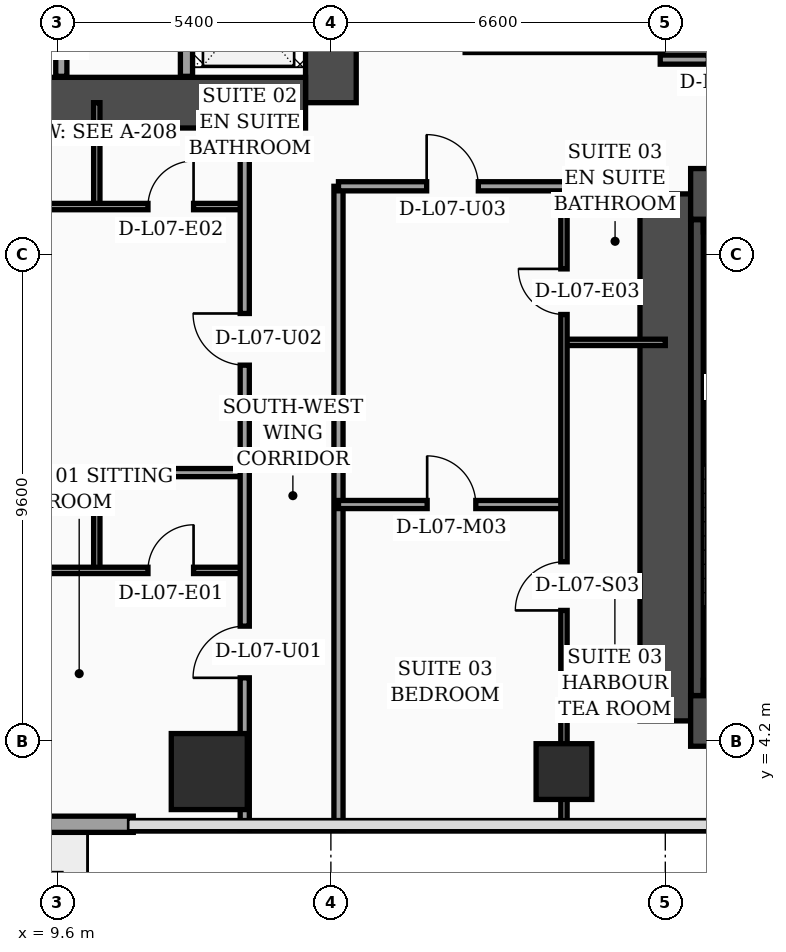
"""IFC4 building model, lengths in metres.
Left out: names, types, materials, properties, quantities, classifications, styles, units other than length and angle.
Written with IfcOpenShell. Run it as: python <this file> out.ifc"""

import sys

from ifc_helpers import new_model, si_unit, direction, frame, frame_2d, origin, origin_2d, place, context, subcontext, project, spatial, rectangle, hollow_rectangle, extrude, element, fill, save


model = new_model("IFC4")
c1 = context("Model", 3, precision=1e-05, world=origin(), true_north=direction((0.0, 1.0)))
c2 = subcontext(c1, "Body", "Model", "MODEL_VIEW")
j1 = project(units=[si_unit("LENGTHUNIT", "METRE"), si_unit("PLANEANGLEUNIT", "RADIAN")], contexts=[c1])
p1 = place(None, origin())
s1 = spatial("IfcSite", under=j1, at=p1, CompositionType="ELEMENT")
p2 = place(p1, origin())
s2 = spatial("IfcBuilding", under=s1, at=p2, CompositionType="ELEMENT")
p3 = place(p2, frame((0.0, 0.0, 34.6)))
s3 = spatial("IfcBuildingStorey", under=s2, at=p3, CompositionType="ELEMENT", Elevation=34.6)
p4 = place(p3, frame((15.0, 16.8, 0.0), z_axis=(0.0, 0.0, 1.0), x_axis=(0.0, 1.0, 0.0)))
e1 = element("IfcWall", 1, at=p4, inside=s3, PredefinedType="SHEAR", context=c2, shape_type="SweptSolid", body=[
    extrude(rectangle(XDim=21.6, YDim=1.0, at=frame_2d((10.8, 0.0))), origin(), (0.0, 0.0, 1.0), 3.56),
])
p5 = place(p4, frame((8.65, 0.0, 0.0)))
e2 = element("IfcOpeningElement", 2, at=p5, cuts=e1, PredefinedType="OPENING", context=c2, shape_type="SweptSolid", body=[
    extrude(rectangle(XDim=1.1, YDim=2.2, at=frame_2d((0.55, 1.1))), frame((0.0, 0.51, 0.0), z_axis=(0.0, -1.0, 0.0), x_axis=(1.0, 0.0, 0.0)), (0.0, 0.0, 1.0), 1.02),
])
p6 = place(p4, frame((1.25, 0.0, 0.0)))
e3 = element("IfcOpeningElement", 3, at=p6, cuts=e1, PredefinedType="OPENING", context=c2, shape_type="SweptSolid", body=[
    extrude(rectangle(XDim=1.1, YDim=2.2, at=frame_2d((0.55, 1.1))), frame((0.0, 0.51, 0.0), z_axis=(0.0, -1.0, 0.0), x_axis=(1.0, 0.0, 0.0)), (0.0, 0.0, 1.0), 1.02),
])
p7 = place(p4, frame((3.8, 0.0, 0.0)))
e4 = element("IfcOpeningElement", 4, at=p7, cuts=e1, PredefinedType="OPENING", context=c2, shape_type="SweptSolid", body=[
    extrude(rectangle(XDim=1.1, YDim=2.2, at=frame_2d((0.55, 1.1))), frame((0.0, 0.51, 0.0), z_axis=(0.0, -1.0, 0.0), x_axis=(1.0, 0.0, 0.0)), (0.0, 0.0, 1.0), 1.02),
])
p8 = place(p4, frame((6.35, 0.0, 0.0)))
e5 = element("IfcOpeningElement", 5, at=p8, cuts=e1, PredefinedType="OPENING", context=c2, shape_type="SweptSolid", body=[
    extrude(rectangle(XDim=1.1, YDim=2.2, at=frame_2d((0.55, 1.1))), frame((0.0, 0.51, 0.0), z_axis=(0.0, -1.0, 0.0), x_axis=(1.0, 0.0, 0.0)), (0.0, 0.0, 1.0), 1.02),
])
p9 = place(p3, frame((4.7, 16.8, 0.0), z_axis=(0.0, 0.0, 1.0), x_axis=(1.0, 0.0, 0.0)))
e6 = element("IfcWall", 6, at=p9, inside=s3, PredefinedType="SHEAR", context=c2, shape_type="SweptSolid", body=[
    extrude(rectangle(XDim=9.8, YDim=1.0, at=frame_2d((4.9, 0.0))), origin(), (0.0, 0.0, 1.0), 3.56),
])
p10 = place(p3, frame((21.6, 4.6, 0.0), z_axis=(0.0, 0.0, 1.0), x_axis=(0.0, 1.0, 0.0)))
e7 = element("IfcWall", 7, at=p10, inside=s3, PredefinedType="SHEAR", context=c2, shape_type="SweptSolid", body=[
    extrude(rectangle(XDim=10.4, YDim=1.0, at=frame_2d((5.2, 0.0))), origin(), (0.0, 0.0, 1.0), 3.56),
])
p11 = place(p3, frame((22.1, 15.0, 0.0), z_axis=(0.0, 0.0, 1.0), x_axis=(1.0, 0.0, 0.0)))
e8 = element("IfcWall", 8, at=p11, inside=s3, PredefinedType="SHEAR", context=c2, shape_type="SweptSolid", body=[
    extrude(rectangle(XDim=9.8, YDim=1.0, at=frame_2d((4.9, 0.0))), origin(), (0.0, 0.0, 1.0), 3.56),
])
p12 = place(p11, frame((4.8, 0.0, 0.0)))
e9 = element("IfcOpeningElement", 9, at=p12, cuts=e8, PredefinedType="OPENING", context=c2, shape_type="SweptSolid", body=[
    extrude(rectangle(XDim=1.1, YDim=2.2, at=frame_2d((0.55, 1.1))), frame((0.0, 0.51, 0.0), z_axis=(0.0, -1.0, 0.0), x_axis=(1.0, 0.0, 0.0)), (0.0, 0.0, 1.0), 1.02),
])
p13 = place(p3, frame((22.1, 4.6, 0.0), z_axis=(0.0, 0.0, 1.0), x_axis=(1.0, 0.0, 0.0)))
e10 = element("IfcWall", 10, at=p13, inside=s3, PredefinedType="SHEAR", context=c2, shape_type="SweptSolid", body=[
    extrude(rectangle(XDim=9.8, YDim=1.0, at=frame_2d((4.9, 0.0))), origin(), (0.0, 0.0, 1.0), 3.56),
])
p14 = place(p3, frame((22.23, 5.1, 0.0), z_axis=(0.0, 0.0, 1.0), x_axis=(0.0, 1.0, 0.0)))
e11 = element("IfcWall", 11, at=p14, inside=s3, PredefinedType="SOLIDWALL", context=c2, shape_type="SweptSolid", body=[
    extrude(rectangle(XDim=9.39, YDim=0.24, at=frame_2d((4.695, 0.0))), origin(), (0.0, 0.0, 1.0), 3.56),
])
for number, where, z_axis, x_axis in (
    (12, (22.35, 5.28, 0.0), (0.0, 0.0, 1.0), (1.0, 0.0, 0.0)),
    (13, (22.35, 14.37, 0.0), (0.0, 0.0, 1.0), (1.0, 0.0, 0.0)),
):
    element("IfcWall", number, at=place(p3, frame(where, z_axis=z_axis, x_axis=x_axis)), inside=s3, PredefinedType="SOLIDWALL", context=c2, shape_type="SweptSolid", body=[
        extrude(rectangle(XDim=3.1, YDim=0.24, at=frame_2d((1.55, 0.0))), origin(), (0.0, 0.0, 1.0), 3.56),
    ])
p15 = place(p3, frame((12.6, 3.6, 0.0), z_axis=(0.0, 0.0, 1.0), x_axis=(1.0, 0.0, 0.0)))
e14 = element("IfcColumn", 14, at=p15, inside=s3, PredefinedType="COLUMN", context=c2, shape_type="SweptSolid", body=[
    extrude(rectangle(XDim=1.5, YDim=1.5, at=origin_2d()), origin(), (0.0, 0.0, 1.0), 3.56),
])
p16 = place(p3, frame((19.6, 3.6, 0.0), z_axis=(0.0, 0.0, 1.0), x_axis=(1.0, 0.0, 0.0)))
e15 = element("IfcColumn", 15, at=p16, inside=s3, PredefinedType="COLUMN", context=c2, shape_type="SweptSolid", body=[
    extrude(hollow_rectangle(XDim=1.1, YDim=1.1, WallThickness=0.045, at=origin_2d()), origin(), (0.0, 0.0, 1.0), 3.56),
])
p17 = place(p3, frame((3.1, 2.56, 0.0), z_axis=(0.0, 0.0, 1.0), x_axis=(1.0, 0.0, 0.0)))
e16 = element("IfcWall", 16, at=p17, inside=s3, PredefinedType="SOLIDWALL", context=c2, shape_type="SweptSolid", body=[
    extrude(rectangle(XDim=8.0, YDim=0.32, at=frame_2d((4.0, 0.0))), origin(), (0.0, 0.0, 1.0), 3.56),
])
p18 = place(p17, frame((0.45, 0.0, 0.75)))
e17 = element("IfcOpeningElement", 17, at=p18, cuts=e16, PredefinedType="OPENING", context=c2, shape_type="SweptSolid", body=[
    extrude(rectangle(XDim=1.0, YDim=1.6, at=frame_2d((0.5, 0.8))), frame((0.0, 0.17, 0.0), z_axis=(0.0, -1.0, 0.0), x_axis=(1.0, 0.0, 0.0)), (0.0, 0.0, 1.0), 0.34),
])
p19 = place(p17, frame((4.2, 0.0, 0.0)))
e18 = element("IfcOpeningElement", 18, at=p19, cuts=e16, PredefinedType="OPENING", context=c2, shape_type="SweptSolid", body=[
    extrude(rectangle(XDim=1.4, YDim=2.25, at=frame_2d((0.7, 1.125))), frame((0.0, 0.17, 0.0), z_axis=(0.0, -1.0, 0.0), x_axis=(1.0, 0.0, 0.0)), (0.0, 0.0, 1.0), 0.34),
])
p20 = place(p3, frame((9.68, 17.32, 0.0), z_axis=(0.0, 0.0, 1.0), x_axis=(0.0, 1.0, 0.0)))
e19 = element("IfcWall", 19, at=p20, inside=s3, PredefinedType="SOLIDWALL", context=c2, shape_type="SweptSolid", body=[
    extrude(rectangle(XDim=7.68, YDim=0.22, at=frame_2d((3.84, 0.0))), origin(), (0.0, 0.0, 1.0), 3.56),
])
p21 = place(p3, frame((12.15, 17.32, 0.0), z_axis=(0.0, 0.0, 1.0), x_axis=(0.0, 1.0, 0.0)))
e20 = element("IfcWall", 20, at=p21, inside=s3, PredefinedType="SOLIDWALL", context=c2, shape_type="SweptSolid", body=[
    extrude(rectangle(XDim=7.65, YDim=0.24, at=frame_2d((3.825, 0.0))), origin(), (0.0, 0.0, 1.0), 3.56),
])
p22 = place(p3, frame((10.38, 7.57, 0.0), z_axis=(0.0, 0.0, 1.0), x_axis=(0.0, 1.0, 0.0)))
e21 = element("IfcWall", 21, at=p22, inside=s3, PredefinedType="PARTITIONING", context=c2, shape_type="SweptSolid", body=[
    extrude(rectangle(XDim=1.93, YDim=0.125, at=frame_2d((0.965, 0.0))), origin(), (0.0, 0.0, 1.0), 3.09),
])
p23 = place(p3, frame((3.2, 7.57, 0.0), z_axis=(0.0, 0.0, 1.0), x_axis=(1.0, 0.0, 0.0)))
e22 = element("IfcWall", 22, at=p23, inside=s3, PredefinedType="PARTITIONING", context=c2, shape_type="SweptSolid", body=[
    extrude(rectangle(XDim=10.1, YDim=0.125, at=frame_2d((5.05, 0.0))), origin(), (0.0, 0.0, 1.0), 2.84),
])
p24 = place(p23, frame((3.29, 0.0, 0.0)))
e23 = element("IfcOpeningElement", 23, at=p24, cuts=e22, PredefinedType="OPENING", context=c2, shape_type="SweptSolid", body=[
    extrude(rectangle(XDim=0.96, YDim=2.2, at=frame_2d((0.48, 1.1))), frame((0.0, 0.073, 0.0), z_axis=(0.0, -1.0, 0.0), x_axis=(1.0, 0.0, 0.0)), (0.0, 0.0, 1.0), 0.145),
])
p25 = place(p23, frame((8.19, 0.0, 0.0)))
e24 = element("IfcOpeningElement", 24, at=p25, cuts=e22, PredefinedType="OPENING", context=c2, shape_type="SweptSolid", body=[
    extrude(rectangle(XDim=0.9, YDim=2.15, at=frame_2d((0.45, 1.075))), frame((0.0, 0.073, 0.0), z_axis=(0.0, -1.0, 0.0), x_axis=(1.0, 0.0, 0.0)), (0.0, 0.0, 1.0), 0.145),
])
p26 = place(p3, frame((10.38, 14.75, 0.0), z_axis=(0.0, 0.0, 1.0), x_axis=(0.0, 1.0, 0.0)))
e25 = element("IfcWall", 25, at=p26, inside=s3, PredefinedType="PARTITIONING", context=c2, shape_type="SweptSolid", body=[
    extrude(rectangle(XDim=2.05, YDim=0.125, at=frame_2d((1.025, 0.0))), origin(), (0.0, 0.0, 1.0), 3.56),
])
p27 = place(p3, frame((0.08, 14.75, 0.0), z_axis=(0.0, 0.0, 1.0), x_axis=(1.0, 0.0, 0.0)))
e26 = element("IfcWall", 26, at=p27, inside=s3, PredefinedType="PARTITIONING", context=c2, shape_type="SweptSolid", body=[
    extrude(rectangle(XDim=13.22, YDim=0.125, at=frame_2d((6.61, 0.0))), origin(), (0.0, 0.0, 1.0), 2.84),
])
p28 = place(p27, frame((4.67, 0.0, 0.0)))
e27 = element("IfcOpeningElement", 27, at=p28, cuts=e26, PredefinedType="OPENING", context=c2, shape_type="SweptSolid", body=[
    extrude(rectangle(XDim=0.96, YDim=2.2, at=frame_2d((0.48, 1.1))), frame((0.0, 0.073, 0.0), z_axis=(0.0, -1.0, 0.0), x_axis=(1.0, 0.0, 0.0)), (0.0, 0.0, 1.0), 0.145),
])
p29 = place(p27, frame((11.31, 0.0, 0.0)))
e28 = element("IfcOpeningElement", 28, at=p29, cuts=e26, PredefinedType="OPENING", context=c2, shape_type="SweptSolid", body=[
    extrude(rectangle(XDim=0.9, YDim=2.15, at=frame_2d((0.45, 1.075))), frame((0.0, 0.073, 0.0), z_axis=(0.0, -1.0, 0.0), x_axis=(1.0, 0.0, 0.0)), (0.0, 0.0, 1.0), 0.145),
])
p30 = place(p3, frame((0.08, 9.5, 0.0), z_axis=(0.0, 0.0, 1.0), x_axis=(1.0, 0.0, 0.0)))
e29 = element("IfcWall", 29, at=p30, inside=s3, PredefinedType="PARTITIONING", context=c2, shape_type="SweptSolid", body=[
    extrude(rectangle(XDim=13.22, YDim=0.16, at=frame_2d((6.61, 0.0))), origin(), (0.0, 0.0, 1.0), 2.84),
])
p31 = place(p3, frame((13.3, 2.44, 0.0), z_axis=(0.0, 0.0, 1.0), x_axis=(0.0, 1.0, 0.0)))
e30 = element("IfcWall", 30, at=p31, inside=s3, PredefinedType="PARTITIONING", context=c2, shape_type="SweptSolid", body=[
    extrude(rectangle(XDim=14.36, YDim=0.18, at=frame_2d((7.18, 0.0))), origin(), (0.0, 0.0, 1.0), 3.04),
])
p32 = place(p31, frame((3.01, 0.0, 0.0)))
e31 = element("IfcOpeningElement", 31, at=p32, cuts=e30, PredefinedType="OPENING", context=c2, shape_type="SweptSolid", body=[
    extrude(rectangle(XDim=1.02, YDim=2.2, at=frame_2d((0.51, 1.1))), frame((0.0, 0.1, 0.0), z_axis=(0.0, -1.0, 0.0), x_axis=(1.0, 0.0, 0.0)), (0.0, 0.0, 1.0), 0.2),
])
p33 = place(p31, frame((9.18, 0.0, 0.0)))
e32 = element("IfcOpeningElement", 32, at=p33, cuts=e30, PredefinedType="OPENING", context=c2, shape_type="SweptSolid", body=[
    extrude(rectangle(XDim=1.02, YDim=2.2, at=frame_2d((0.51, 1.1))), frame((0.0, 0.1, 0.0), z_axis=(0.0, -1.0, 0.0), x_axis=(1.0, 0.0, 0.0)), (0.0, 0.0, 1.0), 0.2),
])
p34 = place(p3, frame((15.15, 2.44, 0.0), z_axis=(0.0, 0.0, 1.0), x_axis=(0.0, 1.0, 0.0)))
e33 = element("IfcWall", 33, at=p34, inside=s3, PredefinedType="PARTITIONING", context=c2, shape_type="SweptSolid", body=[
    extrude(rectangle(XDim=12.71, YDim=0.18, at=frame_2d((6.355, 0.0))), origin(), (0.0, 0.0, 1.0), 3.04),
])
p35 = place(p3, frame((19.6, 12.07, 0.0), z_axis=(0.0, 0.0, 1.0), x_axis=(1.0, 0.0, 0.0)))
e34 = element("IfcWall", 34, at=p35, inside=s3, PredefinedType="PARTITIONING", context=c2, shape_type="SweptSolid", body=[
    extrude(rectangle(XDim=2.0, YDim=0.125, at=frame_2d((1.0, 0.0))), origin(), (0.0, 0.0, 1.0), 3.56),
])
p36 = place(p3, frame((15.15, 8.87, 0.0), z_axis=(0.0, 0.0, 1.0), x_axis=(1.0, 0.0, 0.0)))
e35 = element("IfcWall", 35, at=p36, inside=s3, PredefinedType="PARTITIONING", context=c2, shape_type="SweptSolid", body=[
    extrude(rectangle(XDim=4.45, YDim=0.16, at=frame_2d((2.225, 0.0))), origin(), (0.0, 0.0, 1.0), 3.56),
])
p37 = place(p36, frame((1.75, 0.0, 0.0)))
e36 = element("IfcOpeningElement", 36, at=p37, cuts=e35, PredefinedType="OPENING", context=c2, shape_type="SweptSolid", body=[
    extrude(rectangle(XDim=0.96, YDim=2.2, at=frame_2d((0.48, 1.1))), frame((0.0, 0.09, 0.0), z_axis=(0.0, -1.0, 0.0), x_axis=(1.0, 0.0, 0.0)), (0.0, 0.0, 1.0), 0.18),
])
p38 = place(p3, frame((19.6, 2.44, 0.0), z_axis=(0.0, 0.0, 1.0), x_axis=(0.0, 1.0, 0.0)))
e37 = element("IfcWall", 37, at=p38, inside=s3, PredefinedType="PARTITIONING", context=c2, shape_type="SweptSolid", body=[
    extrude(rectangle(XDim=12.71, YDim=0.125, at=frame_2d((6.355, 0.0))), origin(), (0.0, 0.0, 1.0), 2.34),
])
p39 = place(p38, frame((4.34, 0.0, 0.0)))
e38 = element("IfcOpeningElement", 38, at=p39, cuts=e37, PredefinedType="OPENING", context=c2, shape_type="SweptSolid", body=[
    extrude(rectangle(XDim=0.96, YDim=2.2, at=frame_2d((0.48, 1.1))), frame((0.0, 0.073, 0.0), z_axis=(0.0, -1.0, 0.0), x_axis=(1.0, 0.0, 0.0)), (0.0, 0.0, 1.0), 0.145),
])
p40 = place(p38, frame((10.18, 0.0, 0.0)))
e39 = element("IfcOpeningElement", 39, at=p40, cuts=e37, PredefinedType="OPENING", context=c2, shape_type="SweptSolid", body=[
    extrude(rectangle(XDim=0.9, YDim=2.15, at=frame_2d((0.45, 1.075))), frame((0.0, 0.073, 0.0), z_axis=(0.0, -1.0, 0.0), x_axis=(1.0, 0.0, 0.0)), (0.0, 0.0, 1.0), 0.145),
])
p41 = place(p3, frame((15.15, 15.15, 0.0), z_axis=(0.0, 0.0, 1.0), x_axis=(1.0, 0.0, 0.0)))
e40 = element("IfcWall", 40, at=p41, inside=s3, PredefinedType="PARTITIONING", context=c2, shape_type="SweptSolid", body=[
    extrude(rectangle(XDim=6.45, YDim=0.18, at=frame_2d((3.225, 0.0))), origin(), (0.0, 0.0, 1.0), 2.34),
])
p42 = place(p41, frame((1.74, 0.0, 0.0)))
e41 = element("IfcOpeningElement", 41, at=p42, cuts=e40, PredefinedType="OPENING", context=c2, shape_type="SweptSolid", body=[
    extrude(rectangle(XDim=1.02, YDim=2.2, at=frame_2d((0.51, 1.1))), frame((0.0, 0.1, 0.0), z_axis=(0.0, -1.0, 0.0), x_axis=(1.0, 0.0, 0.0)), (0.0, 0.0, 1.0), 0.2),
])
p43 = place(p3, frame((17.65, 17.88, 0.0), z_axis=(0.0, 0.0, 1.0), x_axis=(1.0, 0.0, 0.0)))
e42 = element("IfcWall", 42, at=p43, inside=s3, PredefinedType="PARTITIONING", context=c2, shape_type="SweptSolid", body=[
    extrude(rectangle(XDim=3.9, YDim=0.18, at=frame_2d((1.95, 0.0))), origin(), (0.0, 0.0, 1.0), 3.09),
])
p44 = place(p3, frame((21.5, 17.65, 0.0), z_axis=(0.0, 0.0, 1.0), x_axis=(1.0, 0.0, 0.0)))
e43 = element("IfcWall", 43, at=p44, inside=s3, PredefinedType="PARTITIONING", context=c2, shape_type="SweptSolid", body=[
    extrude(rectangle(XDim=23.55, YDim=0.18, at=frame_2d((11.775, 0.0))), origin(), (0.0, 0.0, 1.0), 2.84),
])
p45 = place(p44, frame((0.95, 0.0, 0.0)))
e44 = element("IfcOpeningElement", 44, at=p45, cuts=e43, PredefinedType="OPENING", context=c2, shape_type="SweptSolid", body=[
    extrude(rectangle(XDim=1.02, YDim=2.2, at=frame_2d((0.51, 1.1))), frame((0.0, 0.1, 0.0), z_axis=(0.0, -1.0, 0.0), x_axis=(1.0, 0.0, 0.0)), (0.0, 0.0, 1.0), 0.2),
])
p46 = place(p44, frame((9.42, 0.0, 0.0)))
e45 = element("IfcOpeningElement", 45, at=p46, cuts=e43, PredefinedType="OPENING", context=c2, shape_type="SweptSolid", body=[
    extrude(rectangle(XDim=1.02, YDim=2.2, at=frame_2d((0.51, 1.1))), frame((0.0, 0.1, 0.0), z_axis=(0.0, -1.0, 0.0), x_axis=(1.0, 0.0, 0.0)), (0.0, 0.0, 1.0), 0.2),
])
p47 = place(p44, frame((16.58, 0.0, 0.0)))
e46 = element("IfcOpeningElement", 46, at=p47, cuts=e43, PredefinedType="OPENING", context=c2, shape_type="SweptSolid", body=[
    extrude(rectangle(XDim=1.02, YDim=2.2, at=frame_2d((0.51, 1.1))), frame((0.0, 0.1, 0.0), z_axis=(0.0, -1.0, 0.0), x_axis=(1.0, 0.0, 0.0)), (0.0, 0.0, 1.0), 0.2),
])
p48 = place(p25, origin())
e47 = element("IfcDoor", 47, at=p48, inside=s3, OperationType="SINGLE_SWING_RIGHT", PredefinedType="DOOR", context=c2, shape_type="SweptSolid", body=[
    extrude(rectangle(XDim=0.9, YDim=2.15, at=frame_2d((0.45, 1.075))), frame((0.0, 0.025, 0.0), z_axis=(0.0, -1.0, 0.0), x_axis=(1.0, 0.0, 0.0)), (0.0, 0.0, 1.0), 0.05),
])
fill(e24, e47)
p49 = place(p29, origin())
e48 = element("IfcDoor", 48, at=p49, inside=s3, OperationType="SINGLE_SWING_RIGHT", PredefinedType="DOOR", context=c2, shape_type="SweptSolid", body=[
    extrude(rectangle(XDim=0.9, YDim=2.15, at=frame_2d((0.45, 1.075))), frame((0.0, 0.025, 0.0), z_axis=(0.0, -1.0, 0.0), x_axis=(1.0, 0.0, 0.0)), (0.0, 0.0, 1.0), 0.05),
])
fill(e28, e48)
p50 = place(p32, origin())
e49 = element("IfcDoor", 49, at=p50, inside=s3, OperationType="SINGLE_SWING_LEFT", PredefinedType="DOOR", context=c2, shape_type="SweptSolid", body=[
    extrude(rectangle(XDim=1.02, YDim=2.2, at=frame_2d((0.51, 1.1))), frame((0.0, 0.025, 0.0), z_axis=(0.0, -1.0, 0.0), x_axis=(1.0, 0.0, 0.0)), (0.0, 0.0, 1.0), 0.05),
])
fill(e31, e49)
p51 = place(p33, origin())
e50 = element("IfcDoor", 50, at=p51, inside=s3, OperationType="SINGLE_SWING_RIGHT", PredefinedType="DOOR", context=c2, shape_type="SweptSolid", body=[
    extrude(rectangle(XDim=1.02, YDim=2.2, at=frame_2d((0.51, 1.1))), frame((0.0, 0.025, 0.0), z_axis=(0.0, -1.0, 0.0), x_axis=(1.0, 0.0, 0.0)), (0.0, 0.0, 1.0), 0.05),
])
fill(e32, e50)
p52 = place(p37, origin())
e51 = element("IfcDoor", 51, at=p52, inside=s3, OperationType="SINGLE_SWING_LEFT", PredefinedType="DOOR", context=c2, shape_type="SweptSolid", body=[
    extrude(rectangle(XDim=0.96, YDim=2.2, at=frame_2d((0.48, 1.1))), frame((0.0, 0.025, 0.0), z_axis=(0.0, -1.0, 0.0), x_axis=(1.0, 0.0, 0.0)), (0.0, 0.0, 1.0), 0.05),
])
fill(e36, e51)
p53 = place(p39, origin())
e52 = element("IfcDoor", 52, at=p53, inside=s3, OperationType="SINGLE_SWING_LEFT", PredefinedType="DOOR", context=c2, shape_type="SweptSolid", body=[
    extrude(rectangle(XDim=0.96, YDim=2.2, at=frame_2d((0.48, 1.1))), frame((0.0, 0.025, 0.0), z_axis=(0.0, -1.0, 0.0), x_axis=(1.0, 0.0, 0.0)), (0.0, 0.0, 1.0), 0.05),
])
fill(e38, e52)
p54 = place(p40, origin())
e53 = element("IfcDoor", 53, at=p54, inside=s3, OperationType="SINGLE_SWING_RIGHT", PredefinedType="DOOR", context=c2, shape_type="SweptSolid", body=[
    extrude(rectangle(XDim=0.9, YDim=2.15, at=frame_2d((0.45, 1.075))), frame((0.0, 0.025, 0.0), z_axis=(0.0, -1.0, 0.0), x_axis=(1.0, 0.0, 0.0)), (0.0, 0.0, 1.0), 0.05),
])
fill(e39, e53)
p55 = place(p42, origin())
e54 = element("IfcDoor", 54, at=p55, inside=s3, OperationType="SINGLE_SWING_LEFT", PredefinedType="DOOR", context=c2, shape_type="SweptSolid", body=[
    extrude(rectangle(XDim=1.02, YDim=2.2, at=frame_2d((0.51, 1.1))), frame((0.0, 0.025, 0.0), z_axis=(0.0, -1.0, 0.0), x_axis=(1.0, 0.0, 0.0)), (0.0, 0.0, 1.0), 0.05),
])
fill(e41, e54)
save(model, sys.argv[1])
